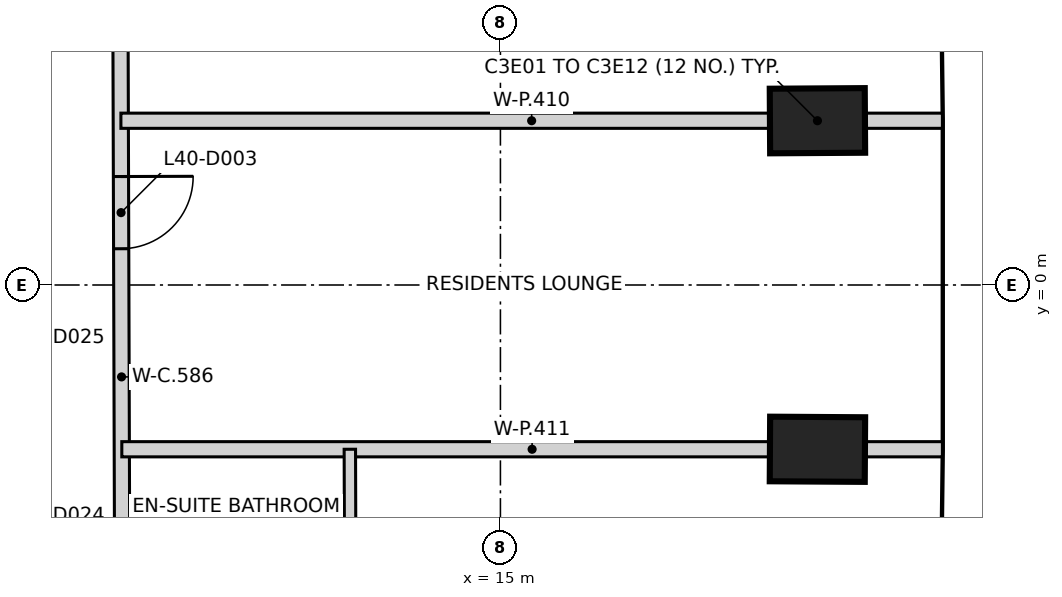
"""IFC4 building model, lengths in metres.
Left out: names, types, materials, properties, quantities, classifications, styles, units other than length and angle.
Written with IfcOpenShell. Run it as: python <this file> out.ifc"""

import sys

from ifc_helpers import new_model, si_unit, direction, frame, frame_2d, origin, origin_2d, place, context, subcontext, project, spatial, rectangle, extrude, element, fill, save


model = new_model("IFC4")
c1 = context("Model", 3, precision=1e-05, world=origin(), true_north=direction((0.0, 1.0)))
c2 = subcontext(c1, "Body", "Model", "MODEL_VIEW")
j1 = project(units=[si_unit("LENGTHUNIT", "METRE"), si_unit("PLANEANGLEUNIT", "RADIAN")], contexts=[c1])
p1 = place(None, origin())
s1 = spatial("IfcSite", under=j1, at=p1, CompositionType="ELEMENT")
p2 = place(p1, origin())
s2 = spatial("IfcBuilding", under=s1, at=p2, CompositionType="ELEMENT")
p3 = place(p2, frame((0.0, 0.0, 161.2)))
s3 = spatial("IfcBuildingStorey", under=s2, at=p3, CompositionType="ELEMENT", Elevation=161.2)
for number, where, z_axis, x_axis in (
    (1, (19.171, -2.161, -0.4), (0.0, 0.0, 1.0), (-1.0, 0.006, 0.0)),
    (2, (19.171, 2.161, -0.4), (0.0, 0.0, 1.0), (1.0, 0.006, 0.0)),
):
    element("IfcColumn", number, at=place(p3, frame(where, z_axis=z_axis, x_axis=x_axis)), inside=s3, PredefinedType="COLUMN", context=c2, shape_type="SweptSolid", body=[
        extrude(rectangle(XDim=1.25, YDim=0.85, at=origin_2d()), origin(), (0.0, 0.0, 1.0), 2.884),
    ])
p4 = place(p3, frame((10.0, 4.078, 0.0), z_axis=(0.0, 0.0, 1.0), x_axis=(0.003070798941, -0.999995285086, 0.0)))
e3 = element("IfcWall", 3, at=p4, inside=s3, PredefinedType="PARTITIONING", context=c2, shape_type="SweptSolid", body=[
    extrude(rectangle(XDim=10.574, YDim=0.2, at=frame_2d((5.287, 0.0))), origin(), (0.0, 0.0, 1.0), 3.2),
])
p5 = place(p4, frame((9.424, 0.0, 0.0)))
e4 = element("IfcOpeningElement", 4, at=p5, cuts=e3, PredefinedType="OPENING", context=c2, shape_type="SweptSolid", body=[
    extrude(rectangle(XDim=0.95, YDim=2.1, at=frame_2d((0.475, 1.05))), frame((0.0, 0.11, 0.0), z_axis=(0.0, -1.0, 0.0), x_axis=(1.0, 0.0, 0.0)), (0.0, 0.0, 1.0), 0.22),
])
p6 = place(p4, frame((2.651, 0.0, 0.0)))
e5 = element("IfcOpeningElement", 5, at=p6, cuts=e3, PredefinedType="OPENING", context=c2, shape_type="SweptSolid", body=[
    extrude(rectangle(XDim=0.95, YDim=2.1, at=frame_2d((0.475, 1.05))), frame((0.0, 0.11, 0.0), z_axis=(0.0, -1.0, 0.0), x_axis=(1.0, 0.0, 0.0)), (0.0, 0.0, 1.0), 0.22),
])
p7 = place(p3, frame((10.007, 2.161, 0.0), z_axis=(0.0, 0.0, 1.0), x_axis=(1.0, 0.0, 0.0)))
e6 = element("IfcWall", 6, at=p7, inside=s3, PredefinedType="PARTITIONING", context=c2, shape_type="SweptSolid", body=[
    extrude(rectangle(XDim=10.808, YDim=0.2, at=frame_2d((5.404, 0.0))), origin(), (0.0, 0.0, 1.0), 3.2),
])
p8 = place(p3, frame((10.019, -2.161, 0.0), z_axis=(0.0, 0.0, 1.0), x_axis=(1.0, 0.0, 0.0)))
e7 = element("IfcWall", 7, at=p8, inside=s3, PredefinedType="PARTITIONING", context=c2, shape_type="SweptSolid", body=[
    extrude(rectangle(XDim=10.796, YDim=0.2, at=frame_2d((5.398, 0.0))), origin(), (0.0, 0.0, 1.0), 3.2),
])
p9 = place(p3, frame((13.019, -2.161, 0.0), z_axis=(0.0, 0.0, 1.0), x_axis=(0.002861218617, -0.999995906706, 0.0)))
e8 = element("IfcWall", 8, at=p9, inside=s3, PredefinedType="PARTITIONING", context=c2, shape_type="SweptSolid", body=[
    extrude(rectangle(XDim=2.389, YDim=0.15, at=frame_2d((1.195, 0.0))), origin(), (0.0, 0.0, 1.0), 3.2),
])
p10 = place(p6, origin())
e9 = element("IfcDoor", 9, at=p10, inside=s3, OperationType="SINGLE_SWING_LEFT", PredefinedType="DOOR", context=c2, shape_type="SweptSolid", body=[
    extrude(rectangle(XDim=0.95, YDim=2.1, at=frame_2d((0.475, 1.05))), frame((0.0, 0.025, 0.0), z_axis=(0.0, -1.0, 0.0), x_axis=(1.0, 0.0, 0.0)), (0.0, 0.0, 1.0), 0.05),
])
fill(e5, e9)
save(model, sys.argv[1])
